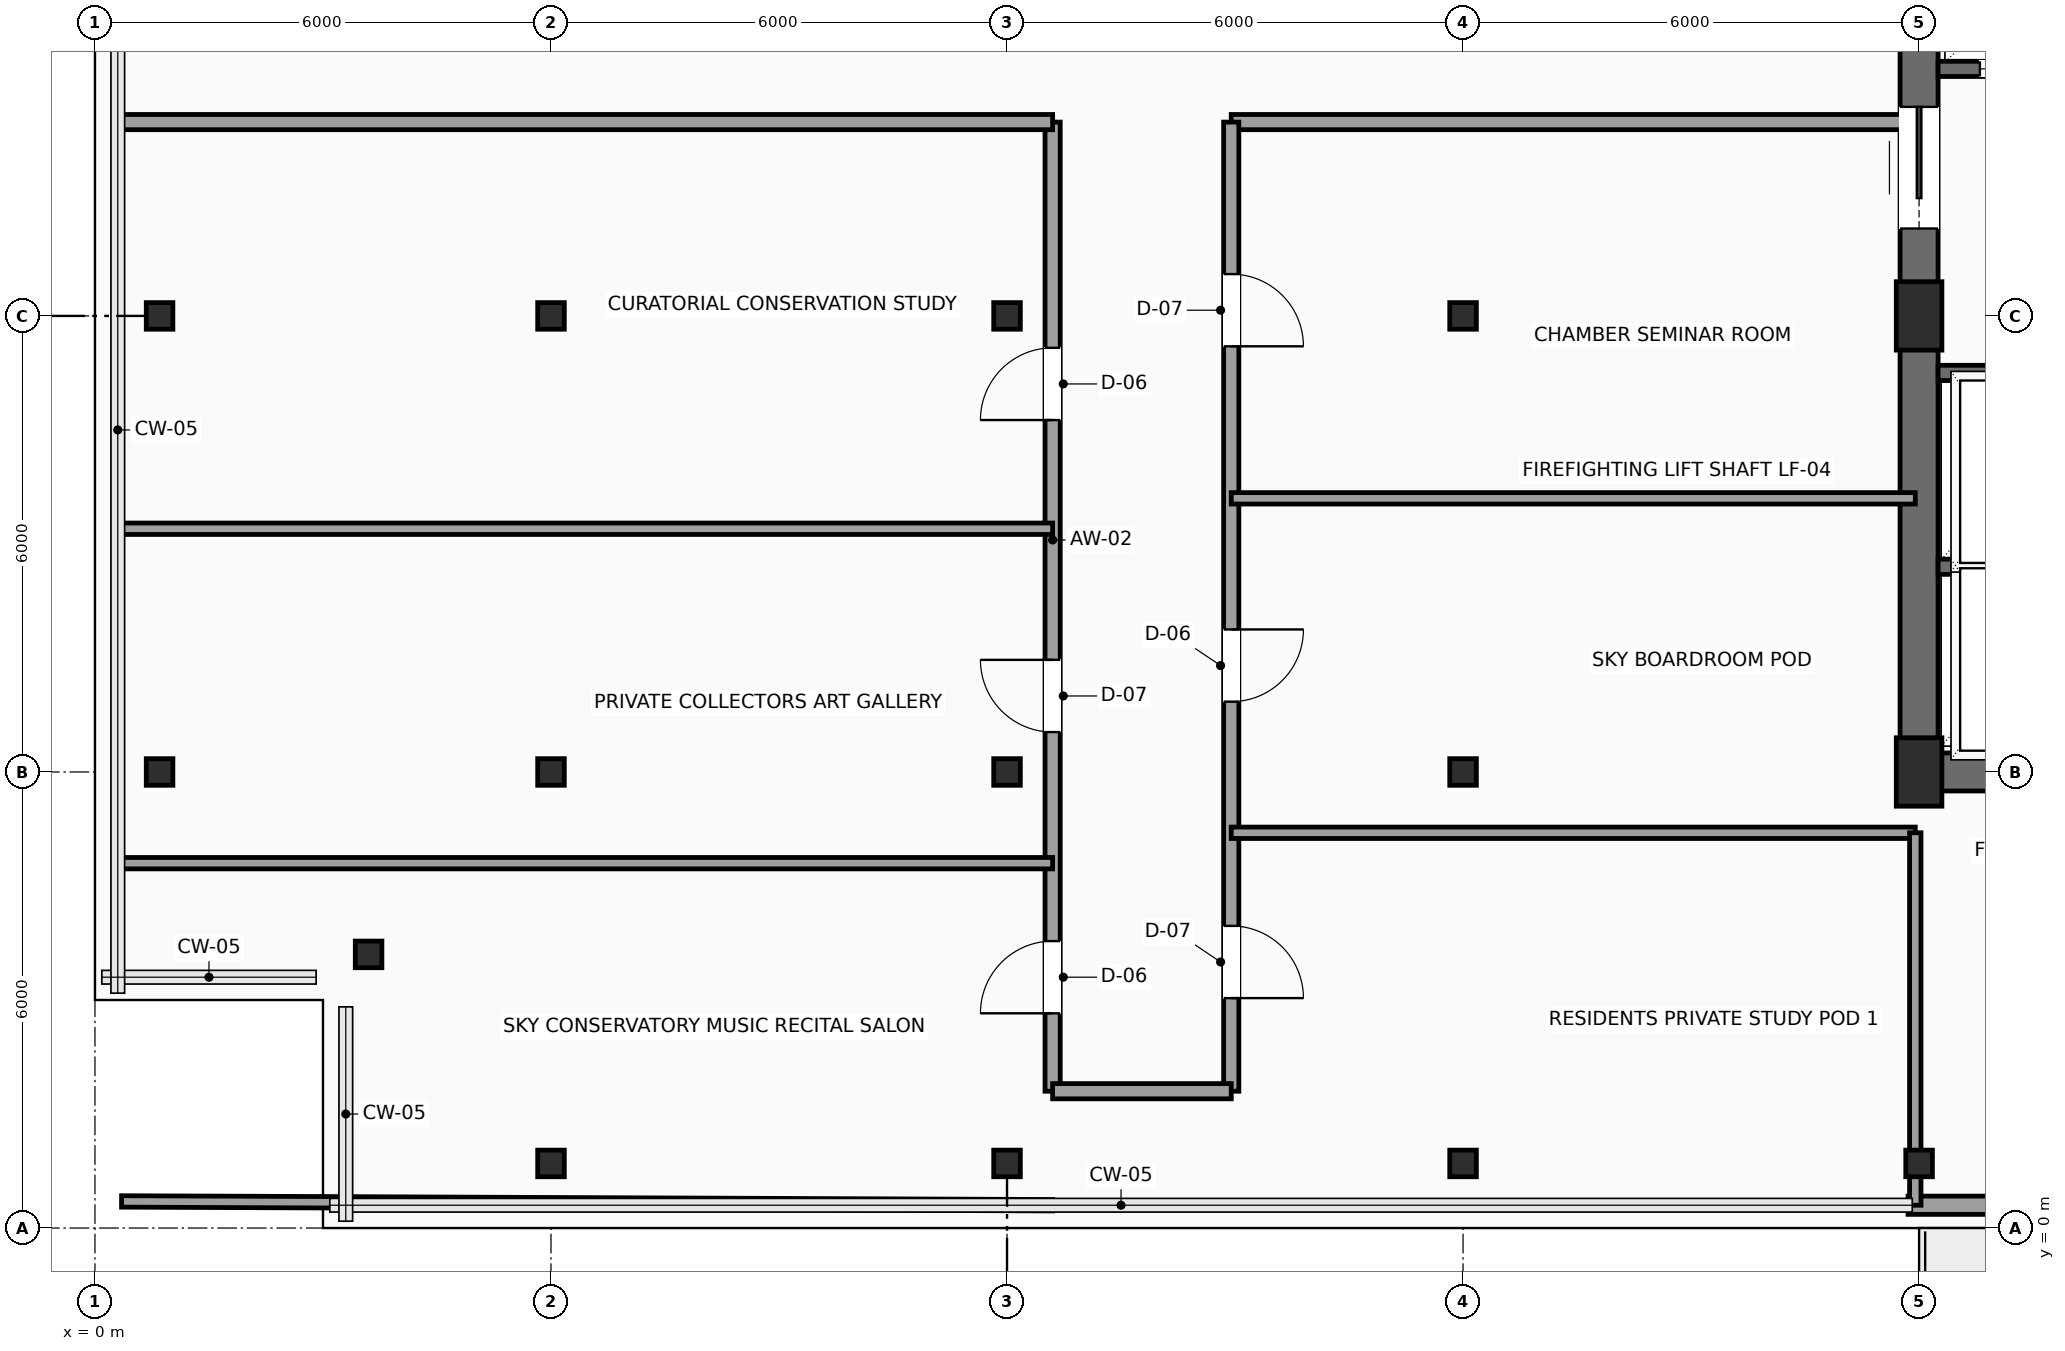
"""IFC4 building model, lengths in metres.
Left out: names, types, materials, properties, quantities, classifications, styles, units other than length and angle.
Written with IfcOpenShell. Run it as: python <this file> out.ifc"""

import sys

from ifc_helpers import new_model, si_unit, direction, frame, frame_2d, origin, origin_2d, place, context, subcontext, project, spatial, rectangle, hollow_rectangle, extrude, element, fill, save


model = new_model("IFC4")
c1 = context("Model", 3, precision=1e-05, world=origin(), true_north=direction((0.0, 1.0)))
c2 = subcontext(c1, "Body", "Model", "MODEL_VIEW")
j1 = project(units=[si_unit("LENGTHUNIT", "METRE"), si_unit("PLANEANGLEUNIT", "RADIAN")], contexts=[c1])
p1 = place(None, origin())
s1 = spatial("IfcSite", under=j1, at=p1, CompositionType="ELEMENT")
p2 = place(p1, origin())
s2 = spatial("IfcBuilding", under=s1, at=p2, CompositionType="ELEMENT")
p3 = place(p2, frame((0.0, 0.0, 274.7)))
s3 = spatial("IfcBuildingStorey", under=s2, at=p3, CompositionType="ELEMENT", Elevation=274.7)
for number, where, z_axis, x_axis in (
    (1, (24.0, 6.0, 0.0), (0.0, 0.0, 1.0), (1.0, 0.0, 0.0)),
    (2, (24.0, 12.0, 0.0), (0.0, 0.0, 1.0), (1.0, 0.0, 0.0)),
):
    element("IfcColumn", number, at=place(p3, frame(where, z_axis=z_axis, x_axis=x_axis)), inside=s3, PredefinedType="COLUMN", context=c2, shape_type="SweptSolid", body=[
        extrude(rectangle(XDim=0.6, YDim=0.9, at=origin_2d()), origin(), (0.0, 0.0, 1.0), 3.5),
    ])
for number, where, z_axis, x_axis in (
    (3, (3.6, 3.6, 0.0), (0.0, 0.0, 1.0), (1.0, 0.0, 0.0)),
    (4, (0.85, 6.0, 0.0), (0.0, 0.0, 1.0), (1.0, 0.0, 0.0)),
    (5, (0.85, 12.0, 0.0), (0.0, 0.0, 1.0), (1.0, 0.0, 0.0)),
    (6, (6.0, 0.85, 0.0), (0.0, 0.0, 1.0), (1.0, 0.0, 0.0)),
    (7, (6.0, 6.0, 0.0), (0.0, 0.0, 1.0), (1.0, 0.0, 0.0)),
    (8, (6.0, 12.0, 0.0), (0.0, 0.0, 1.0), (1.0, 0.0, 0.0)),
    (9, (12.0, 0.85, 0.0), (0.0, 0.0, 1.0), (1.0, 0.0, 0.0)),
    (10, (12.0, 6.0, 0.0), (0.0, 0.0, 1.0), (1.0, 0.0, 0.0)),
    (11, (12.0, 12.0, 0.0), (0.0, 0.0, 1.0), (1.0, 0.0, 0.0)),
    (12, (18.0, 0.85, 0.0), (0.0, 0.0, 1.0), (1.0, 0.0, 0.0)),
    (13, (18.0, 6.0, 0.0), (0.0, 0.0, 1.0), (1.0, 0.0, 0.0)),
    (14, (18.0, 12.0, 0.0), (0.0, 0.0, 1.0), (1.0, 0.0, 0.0)),
    (15, (24.0, 0.85, 0.0), (0.0, 0.0, 1.0), (1.0, 0.0, 0.0)),
):
    element("IfcColumn", number, at=place(p3, frame(where, z_axis=z_axis, x_axis=x_axis)), inside=s3, PredefinedType="COLUMN", context=c2, shape_type="SweptSolid", body=[
        extrude(hollow_rectangle(XDim=0.35, YDim=0.35, WallThickness=0.016, InnerFilletRadius=0.016, OuterFilletRadius=0.032, at=origin_2d()), origin(), (0.0, 0.0, 1.0), 3.5),
    ])
p4 = place(p3, frame((33.145, 0.3, 0.0), z_axis=(0.0, 0.0, 1.0), x_axis=(-1.0, 0.0, 0.0)))
e16 = element("IfcWall", 16, at=p4, inside=s3, PredefinedType="SOLIDWALL", context=c2, shape_type="SweptSolid", body=[
    extrude(rectangle(XDim=9.29, YDim=0.24, at=frame_2d((4.645, 0.0))), origin(), (0.0, 0.0, 1.0), 3.3),
])
p5 = place(p4, frame((3.945, 0.0, 0.0)))
e17 = element("IfcOpeningElement", 17, at=p5, cuts=e16, PredefinedType="OPENING", context=c2, shape_type="SweptSolid", body=[
    extrude(rectangle(XDim=1.05, YDim=2.2, at=frame_2d((0.525, 1.1))), frame((0.0, 0.13, 0.0), z_axis=(0.0, -1.0, 0.0), x_axis=(1.0, 0.0, 0.0)), (0.0, 0.0, 1.0), 0.26),
])
p6 = place(p4, frame((5.345, 0.0, 0.6)))
e18 = element("IfcOpeningElement", 18, at=p6, cuts=e16, PredefinedType="OPENING", context=c2, shape_type="SweptSolid", body=[
    extrude(rectangle(XDim=2.7, YDim=2.3, at=frame_2d((1.35, 1.15))), frame((0.0, 0.13, 0.0), z_axis=(0.0, -1.0, 0.0), x_axis=(1.0, 0.0, 0.0)), (0.0, 0.0, 1.0), 0.26),
])
p7 = place(p4, frame((1.4, 0.0, 0.6)))
e19 = element("IfcOpeningElement", 19, at=p7, cuts=e16, PredefinedType="OPENING", context=c2, shape_type="SweptSolid", body=[
    extrude(rectangle(XDim=0.9, YDim=2.2, at=frame_2d((0.45, 1.1))), frame((0.0, 0.13, 0.0), z_axis=(0.0, -1.0, 0.0), x_axis=(1.0, 0.0, 0.0)), (0.0, 0.0, 1.0), 0.26),
])
p8 = place(p3, frame((24.0, 6.0, 0.0), z_axis=(0.0, 0.0, 1.0), x_axis=(1.0, 0.0, 0.0)))
e20 = element("IfcWall", 20, at=p8, inside=s3, PredefinedType="SHEAR", context=c2, shape_type="SweptSolid", body=[
    extrude(rectangle(XDim=9.6, YDim=0.5, at=frame_2d((4.8, 0.0))), origin(), (0.0, 0.0, 1.0), 3.3),
])
p9 = place(p3, frame((24.0, 6.0, 0.0), z_axis=(0.0, 0.0, 1.0), x_axis=(0.0, 1.0, 0.0)))
e21 = element("IfcWall", 21, at=p9, inside=s3, PredefinedType="SHEAR", context=c2, shape_type="SweptSolid", body=[
    extrude(rectangle(XDim=12.0, YDim=0.5, at=frame_2d((6.0, 0.0))), origin(), (0.0, 0.0, 1.0), 3.3),
])
p10 = place(p9, frame((7.15, 0.0, 0.0)))
e22 = element("IfcOpeningElement", 22, at=p10, cuts=e21, PredefinedType="OPENING", context=c2, shape_type="SweptSolid", body=[
    extrude(rectangle(XDim=1.6, YDim=2.3, at=frame_2d((0.8, 1.15))), frame((0.0, 0.26, 0.0), z_axis=(0.0, -1.0, 0.0), x_axis=(1.0, 0.0, 0.0)), (0.0, 0.0, 1.0), 0.52),
])
for number, where, z_axis, x_axis in (
    (23, (24.25, 8.7, 0.0), (0.0, 0.0, 1.0), (1.0, 0.0, 0.0)),
    (24, (24.25, 11.25, 0.0), (0.0, 0.0, 1.0), (1.0, 0.0, 0.0)),
):
    element("IfcWall", number, at=place(p3, frame(where, z_axis=z_axis, x_axis=x_axis)), inside=s3, PredefinedType="SHEAR", context=c2, shape_type="SweptSolid", body=[
        extrude(rectangle(XDim=2.17, YDim=0.2, at=frame_2d((1.085, 0.0))), origin(), (0.0, 0.0, 1.0), 3.3),
    ])
p11 = place(p3, frame((24.25, 15.25, 0.0), z_axis=(0.0, 0.0, 1.0), x_axis=(1.0, 0.0, 0.0)))
e25 = element("IfcWall", 25, at=p11, inside=s3, PredefinedType="SHEAR", context=c2, shape_type="SweptSolid", body=[
    extrude(rectangle(XDim=5.2, YDim=0.2, at=frame_2d((2.6, 0.0))), origin(), (0.0, 0.0, 1.0), 3.3),
])
p12 = place(p11, frame((0.55, 0.0, 0.0)))
e26 = element("IfcOpeningElement", 26, at=p12, cuts=e25, PredefinedType="OPENING", context=c2, shape_type="SweptSolid", body=[
    extrude(rectangle(XDim=1.2, YDim=2.2, at=frame_2d((0.6, 1.1))), frame((0.0, 0.11, 0.0), z_axis=(0.0, -1.0, 0.0), x_axis=(1.0, 0.0, 0.0)), (0.0, 0.0, 1.0), 0.22),
])
p13 = place(p11, frame((3.15, 0.0, 0.0)))
e27 = element("IfcOpeningElement", 27, at=p13, cuts=e25, PredefinedType="OPENING", context=c2, shape_type="SweptSolid", body=[
    extrude(rectangle(XDim=1.2, YDim=2.2, at=frame_2d((0.6, 1.1))), frame((0.0, 0.11, 0.0), z_axis=(0.0, -1.0, 0.0), x_axis=(1.0, 0.0, 0.0)), (0.0, 0.0, 1.0), 0.22),
])
p14 = place(p3, frame((12.6, 1.8, 0.0), z_axis=(0.0, 0.0, 1.0), x_axis=(0.0, 1.0, 0.0)))
e28 = element("IfcWall", 28, at=p14, inside=s3, PredefinedType="PARTITIONING", context=c2, shape_type="SweptSolid", body=[
    extrude(rectangle(XDim=12.75, YDim=0.2, at=frame_2d((6.375, 0.0))), origin(), (0.0, 0.0, 1.0), 3.3),
])
p15 = place(p14, frame((1.025, 0.0, 0.0)))
e29 = element("IfcOpeningElement", 29, at=p15, cuts=e28, PredefinedType="OPENING", context=c2, shape_type="SweptSolid", body=[
    extrude(rectangle(XDim=0.95, YDim=2.15, at=frame_2d((0.475, 1.075))), frame((0.0, 0.11, 0.0), z_axis=(0.0, -1.0, 0.0), x_axis=(1.0, 0.0, 0.0)), (0.0, 0.0, 1.0), 0.22),
])
p16 = place(p14, frame((4.725, 0.0, 0.0)))
e30 = element("IfcOpeningElement", 30, at=p16, cuts=e28, PredefinedType="OPENING", context=c2, shape_type="SweptSolid", body=[
    extrude(rectangle(XDim=0.95, YDim=2.15, at=frame_2d((0.475, 1.075))), frame((0.0, 0.11, 0.0), z_axis=(0.0, -1.0, 0.0), x_axis=(1.0, 0.0, 0.0)), (0.0, 0.0, 1.0), 0.22),
])
p17 = place(p14, frame((8.83, 0.0, 0.0)))
e31 = element("IfcOpeningElement", 31, at=p17, cuts=e28, PredefinedType="OPENING", context=c2, shape_type="SweptSolid", body=[
    extrude(rectangle(XDim=0.95, YDim=2.15, at=frame_2d((0.475, 1.075))), frame((0.0, 0.11, 0.0), z_axis=(0.0, -1.0, 0.0), x_axis=(1.0, 0.0, 0.0)), (0.0, 0.0, 1.0), 0.22),
])
p18 = place(p3, frame((12.6, 14.55, 0.0), z_axis=(0.0, 0.0, 1.0), x_axis=(-1.0, 0.0, 0.0)))
e32 = element("IfcWall", 32, at=p18, inside=s3, PredefinedType="PARTITIONING", context=c2, shape_type="SweptSolid", body=[
    extrude(rectangle(XDim=12.3, YDim=0.2, at=frame_2d((6.15, 0.0))), origin(), (0.0, 0.0, 1.0), 3.3),
])
p19 = place(p3, frame((23.95, 14.55, 0.0), z_axis=(0.0, 0.0, 1.0), x_axis=(-1.0, 0.0, 0.0)))
e33 = element("IfcWall", 33, at=p19, inside=s3, PredefinedType="PARTITIONING", context=c2, shape_type="SweptSolid", body=[
    extrude(rectangle(XDim=9.0, YDim=0.2, at=frame_2d((4.5, 0.0))), origin(), (0.0, 0.0, 1.0), 3.3),
])
p20 = place(p3, frame((14.95, 14.55, 0.0), z_axis=(0.0, 0.0, 1.0), x_axis=(0.0, -1.0, 0.0)))
e34 = element("IfcWall", 34, at=p20, inside=s3, PredefinedType="PARTITIONING", context=c2, shape_type="SweptSolid", body=[
    extrude(rectangle(XDim=12.75, YDim=0.2, at=frame_2d((6.375, 0.0))), origin(), (0.0, 0.0, 1.0), 3.3),
])
p21 = place(p20, frame((10.575, 0.0, 0.0)))
e35 = element("IfcOpeningElement", 35, at=p21, cuts=e34, PredefinedType="OPENING", context=c2, shape_type="SweptSolid", body=[
    extrude(rectangle(XDim=0.95, YDim=2.15, at=frame_2d((0.475, 1.075))), frame((0.0, 0.11, 0.0), z_axis=(0.0, -1.0, 0.0), x_axis=(1.0, 0.0, 0.0)), (0.0, 0.0, 1.0), 0.22),
])
p22 = place(p20, frame((6.675, 0.0, 0.0)))
e36 = element("IfcOpeningElement", 36, at=p22, cuts=e34, PredefinedType="OPENING", context=c2, shape_type="SweptSolid", body=[
    extrude(rectangle(XDim=0.95, YDim=2.15, at=frame_2d((0.475, 1.075))), frame((0.0, 0.11, 0.0), z_axis=(0.0, -1.0, 0.0), x_axis=(1.0, 0.0, 0.0)), (0.0, 0.0, 1.0), 0.22),
])
p23 = place(p20, frame((2.0, 0.0, 0.0)))
e37 = element("IfcOpeningElement", 37, at=p23, cuts=e34, PredefinedType="OPENING", context=c2, shape_type="SweptSolid", body=[
    extrude(rectangle(XDim=0.95, YDim=2.15, at=frame_2d((0.475, 1.075))), frame((0.0, 0.11, 0.0), z_axis=(0.0, -1.0, 0.0), x_axis=(1.0, 0.0, 0.0)), (0.0, 0.0, 1.0), 0.22),
])
p24 = place(p3, frame((14.95, 1.8, 0.0), z_axis=(0.0, 0.0, 1.0), x_axis=(-1.0, 0.0, 0.0)))
e38 = element("IfcWall", 38, at=p24, inside=s3, PredefinedType="PARTITIONING", context=c2, shape_type="SweptSolid", body=[
    extrude(rectangle(XDim=2.35, YDim=0.2, at=frame_2d((1.175, 0.0))), origin(), (0.0, 0.0, 1.0), 3.3),
])
p25 = place(p3, frame((0.35, 0.35, 0.0), z_axis=(0.0, 0.0, 1.0), x_axis=(0.999991653965, -0.004085584524, 0.0)))
e39 = element("IfcWall", 39, at=p25, inside=s3, PredefinedType="PARTITIONING", context=c2, shape_type="SweptSolid", body=[
    extrude(rectangle(XDim=12.25, YDim=0.15, at=frame_2d((6.125, 0.0))), origin(), (0.0, 0.0, 1.0), 3.3),
])
p26 = place(p3, frame((0.3, 4.8, 0.0), z_axis=(0.0, 0.0, 1.0), x_axis=(1.0, 0.0, 0.0)))
e40 = element("IfcWall", 40, at=p26, inside=s3, PredefinedType="PARTITIONING", context=c2, shape_type="SweptSolid", body=[
    extrude(rectangle(XDim=12.3, YDim=0.15, at=frame_2d((6.15, 0.0))), origin(), (0.0, 0.0, 1.0), 3.3),
])
p27 = place(p3, frame((0.3, 9.2, 0.0), z_axis=(0.0, 0.0, 1.0), x_axis=(1.0, 0.0, 0.0)))
e41 = element("IfcWall", 41, at=p27, inside=s3, PredefinedType="PARTITIONING", context=c2, shape_type="SweptSolid", body=[
    extrude(rectangle(XDim=12.3, YDim=0.15, at=frame_2d((6.15, 0.0))), origin(), (0.0, 0.0, 1.0), 2.932),
])
p28 = place(p3, frame((14.95, 5.2, 0.0), z_axis=(0.0, 0.0, 1.0), x_axis=(1.0, 0.0, 0.0)))
e42 = element("IfcWall", 42, at=p28, inside=s3, PredefinedType="PARTITIONING", context=c2, shape_type="SweptSolid", body=[
    extrude(rectangle(XDim=9.0, YDim=0.15, at=frame_2d((4.5, 0.0))), origin(), (0.0, 0.0, 1.0), 3.3),
])
p29 = place(p3, frame((23.95, 0.3, 0.0), z_axis=(0.0, 0.0, 1.0), x_axis=(0.0, 1.0, 0.0)))
e43 = element("IfcWall", 43, at=p29, inside=s3, PredefinedType="PARTITIONING", context=c2, shape_type="SweptSolid", body=[
    extrude(rectangle(XDim=4.9, YDim=0.15, at=frame_2d((2.45, 0.0))), origin(), (0.0, 0.0, 1.0), 2.992),
])
p30 = place(p3, frame((14.95, 9.6, 0.0), z_axis=(0.0, 0.0, 1.0), x_axis=(1.0, 0.0, 0.0)))
e44 = element("IfcWall", 44, at=p30, inside=s3, PredefinedType="PARTITIONING", context=c2, shape_type="SweptSolid", body=[
    extrude(rectangle(XDim=9.0, YDim=0.15, at=frame_2d((4.5, 0.0))), origin(), (0.0, 0.0, 1.0), 3.3),
])
p31 = place(p10, origin())
e45 = element("IfcDoor", 45, at=p31, inside=s3, OperationType="DOUBLE_DOOR_SLIDING", PredefinedType="DOOR", context=c2, shape_type="SweptSolid", body=[
    extrude(rectangle(XDim=1.6, YDim=2.3, at=frame_2d((0.8, 1.15))), frame((0.0, 0.025, 0.0), z_axis=(0.0, -1.0, 0.0), x_axis=(1.0, 0.0, 0.0)), (0.0, 0.0, 1.0), 0.05),
])
fill(e22, e45)
p32 = place(p12, origin())
e46 = element("IfcDoor", 46, at=p32, inside=s3, OperationType="SLIDING_TO_RIGHT", PredefinedType="DOOR", context=c2, shape_type="SweptSolid", body=[
    extrude(rectangle(XDim=1.2, YDim=2.2, at=frame_2d((0.6, 1.1))), frame((0.0, 0.025, 0.0), z_axis=(0.0, -1.0, 0.0), x_axis=(1.0, 0.0, 0.0)), (0.0, 0.0, 1.0), 0.05),
])
fill(e26, e46)
p33 = place(p15, origin())
e47 = element("IfcDoor", 47, at=p33, inside=s3, OperationType="SINGLE_SWING_LEFT", PredefinedType="DOOR", context=c2, shape_type="SweptSolid", body=[
    extrude(rectangle(XDim=0.95, YDim=2.15, at=frame_2d((0.475, 1.075))), frame((0.0, 0.025, 0.0), z_axis=(0.0, -1.0, 0.0), x_axis=(1.0, 0.0, 0.0)), (0.0, 0.0, 1.0), 0.05),
])
fill(e29, e47)
p34 = place(p16, origin())
e48 = element("IfcDoor", 48, at=p34, inside=s3, OperationType="SINGLE_SWING_RIGHT", PredefinedType="DOOR", context=c2, shape_type="SweptSolid", body=[
    extrude(rectangle(XDim=0.95, YDim=2.15, at=frame_2d((0.475, 1.075))), frame((0.0, 0.025, 0.0), z_axis=(0.0, -1.0, 0.0), x_axis=(1.0, 0.0, 0.0)), (0.0, 0.0, 1.0), 0.05),
])
fill(e30, e48)
p35 = place(p17, origin())
e49 = element("IfcDoor", 49, at=p35, inside=s3, OperationType="SINGLE_SWING_LEFT", PredefinedType="DOOR", context=c2, shape_type="SweptSolid", body=[
    extrude(rectangle(XDim=0.95, YDim=2.15, at=frame_2d((0.475, 1.075))), frame((0.0, 0.025, 0.0), z_axis=(0.0, -1.0, 0.0), x_axis=(1.0, 0.0, 0.0)), (0.0, 0.0, 1.0), 0.05),
])
fill(e31, e49)
p36 = place(p21, origin())
e50 = element("IfcDoor", 50, at=p36, inside=s3, OperationType="SINGLE_SWING_RIGHT", PredefinedType="DOOR", context=c2, shape_type="SweptSolid", body=[
    extrude(rectangle(XDim=0.95, YDim=2.15, at=frame_2d((0.475, 1.075))), frame((0.0, 0.025, 0.0), z_axis=(0.0, -1.0, 0.0), x_axis=(1.0, 0.0, 0.0)), (0.0, 0.0, 1.0), 0.05),
])
fill(e35, e50)
p37 = place(p22, origin())
e51 = element("IfcDoor", 51, at=p37, inside=s3, OperationType="SINGLE_SWING_LEFT", PredefinedType="DOOR", context=c2, shape_type="SweptSolid", body=[
    extrude(rectangle(XDim=0.95, YDim=2.15, at=frame_2d((0.475, 1.075))), frame((0.0, 0.025, 0.0), z_axis=(0.0, -1.0, 0.0), x_axis=(1.0, 0.0, 0.0)), (0.0, 0.0, 1.0), 0.05),
])
fill(e36, e51)
p38 = place(p23, origin())
e52 = element("IfcDoor", 52, at=p38, inside=s3, OperationType="SINGLE_SWING_RIGHT", PredefinedType="DOOR", context=c2, shape_type="SweptSolid", body=[
    extrude(rectangle(XDim=0.95, YDim=2.15, at=frame_2d((0.475, 1.075))), frame((0.0, 0.025, 0.0), z_axis=(0.0, -1.0, 0.0), x_axis=(1.0, 0.0, 0.0)), (0.0, 0.0, 1.0), 0.05),
])
fill(e37, e52)
save(model, sys.argv[1])
